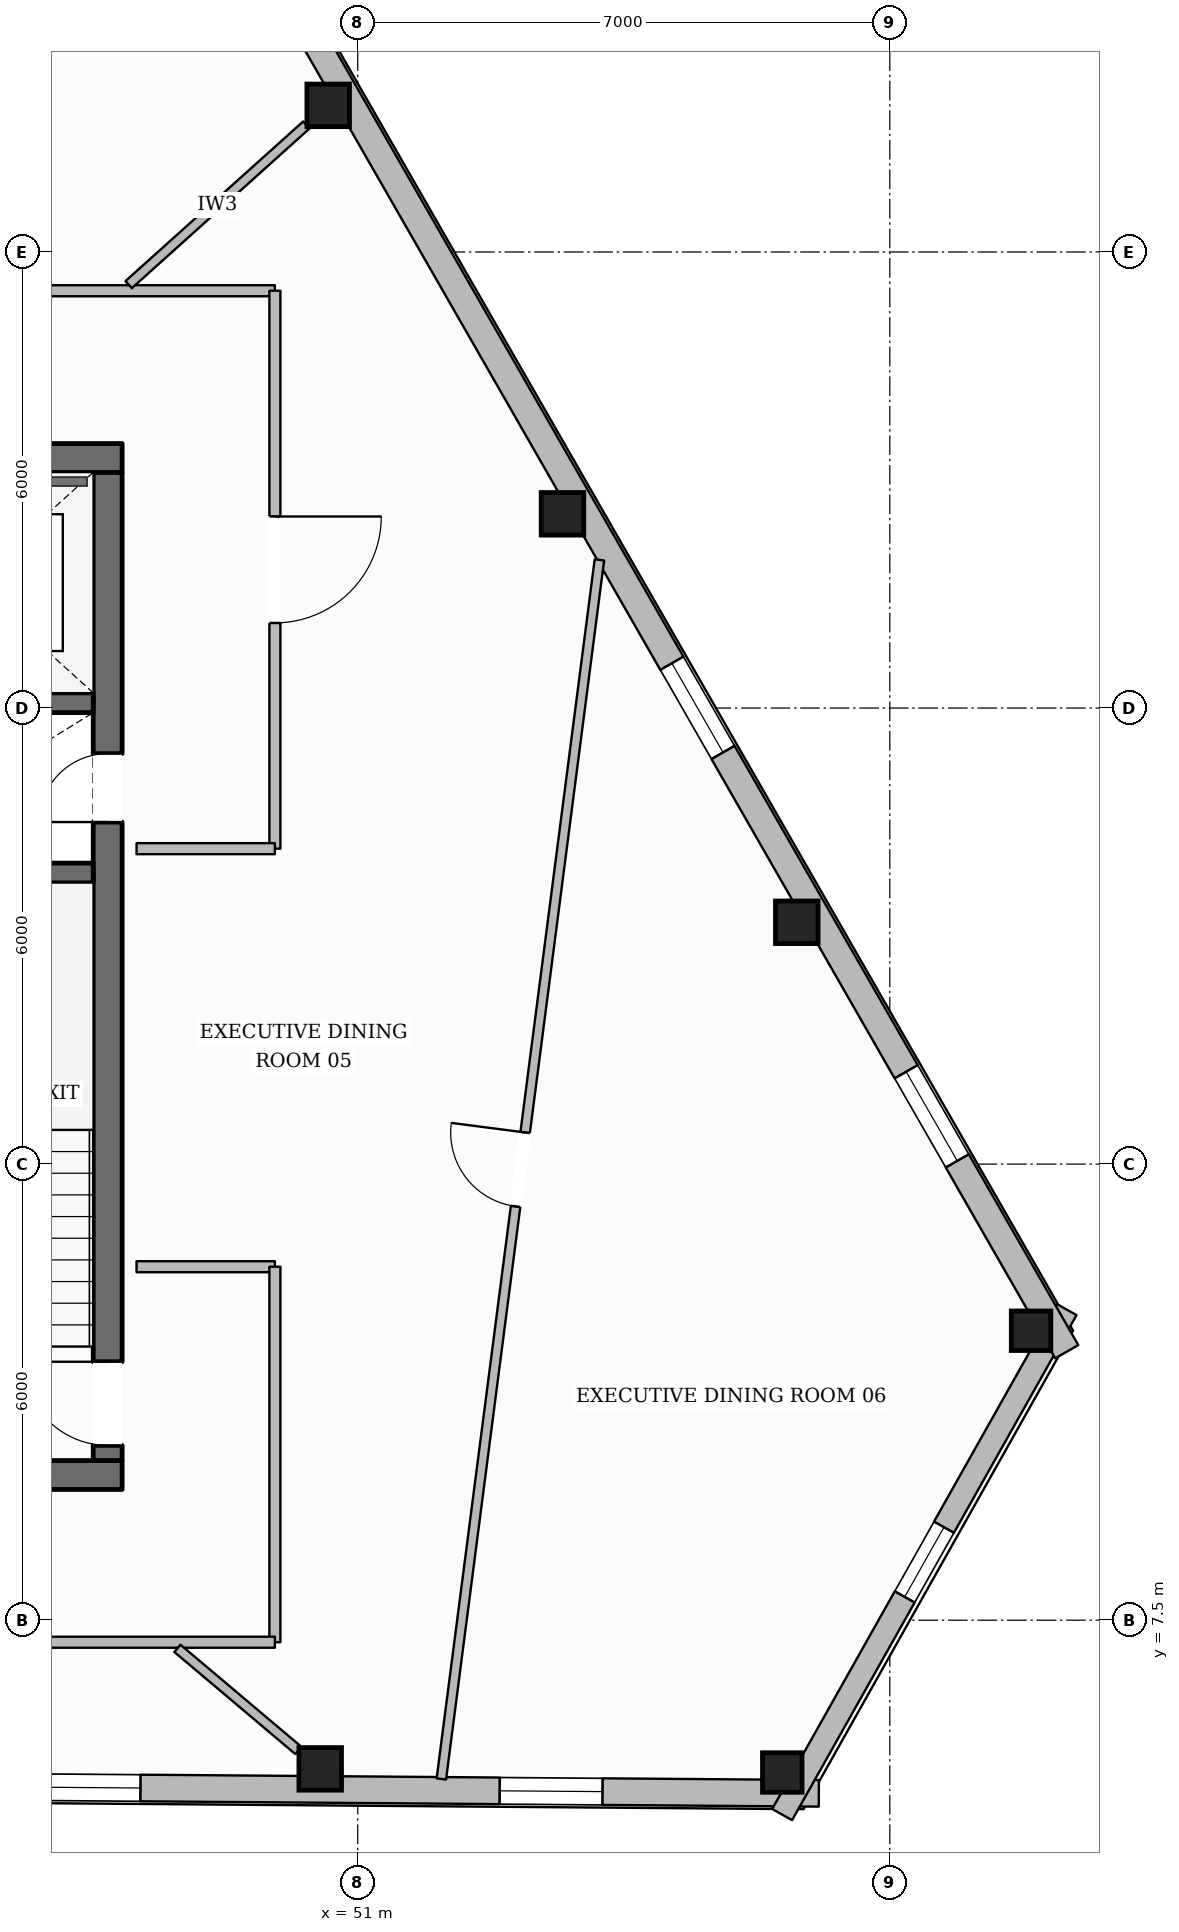
"""IFC4 building model, lengths in metres.
Left out: names, types, materials, properties, quantities, classifications, styles, units other than length and angle.
Written with IfcOpenShell. Run it as: python <this file> out.ifc"""

import sys

from ifc_helpers import new_model, si_unit, direction, frame, frame_2d, origin, origin_2d, place, context, subcontext, project, spatial, rectangle, hollow_rectangle, extrude, element, fill, save


model = new_model("IFC4")
c1 = context("Model", 3, precision=1e-05, world=origin(), true_north=direction((0.0, 1.0)))
c2 = subcontext(c1, "Body", "Model", "MODEL_VIEW")
j1 = project(units=[si_unit("LENGTHUNIT", "METRE"), si_unit("PLANEANGLEUNIT", "RADIAN")], contexts=[c1])
p1 = place(None, origin())
s1 = spatial("IfcSite", under=j1, at=p1, CompositionType="ELEMENT")
p2 = place(p1, origin())
s2 = spatial("IfcBuilding", under=s1, at=p2, CompositionType="ELEMENT")
p3 = place(p2, frame((0.0, 0.0, 243.35)))
s3 = spatial("IfcBuildingStorey", under=s2, at=p3, CompositionType="ELEMENT", Elevation=243.35)
p4 = place(p3, frame((28.1, 9.41, 0.0), z_axis=(0.0, 0.0, 1.0), x_axis=(1.0, 0.0, 0.0)))
e1 = element("IfcWall", 1, at=p4, inside=s3, PredefinedType="SOLIDWALL", context=c2, shape_type="SweptSolid", body=[
    extrude(rectangle(XDim=19.8, YDim=0.38, at=frame_2d((9.9, 0.0))), origin(), (0.0, 0.0, 1.0), 3.61),
])
p5 = place(p4, frame((10.4, 0.0, 0.0)))
e2 = element("IfcOpeningElement", 2, at=p5, cuts=e1, PredefinedType="OPENING", context=c2, shape_type="SweptSolid", body=[
    extrude(rectangle(XDim=1.4, YDim=2.2, at=frame_2d((0.7, 1.1))), frame((0.0, 0.2, 0.0), z_axis=(0.0, -1.0, 0.0), x_axis=(1.0, 0.0, 0.0)), (0.0, 0.0, 1.0), 0.4),
])
p6 = place(p3, frame((28.1, 22.79, 0.0), z_axis=(0.0, 0.0, 1.0), x_axis=(1.0, 0.0, 0.0)))
e3 = element("IfcWall", 3, at=p6, inside=s3, PredefinedType="SOLIDWALL", context=c2, shape_type="SweptSolid", body=[
    extrude(rectangle(XDim=19.8, YDim=0.38, at=frame_2d((9.9, 0.0))), origin(), (0.0, 0.0, 1.0), 3.61),
])
p7 = place(p6, frame((6.175, 0.0, 0.0)))
e4 = element("IfcOpeningElement", 4, at=p7, cuts=e3, PredefinedType="OPENING", context=c2, shape_type="SweptSolid", body=[
    extrude(rectangle(XDim=1.05, YDim=2.15, at=frame_2d((0.525, 1.075))), frame((0.0, 0.2, 0.0), z_axis=(0.0, -1.0, 0.0), x_axis=(1.0, 0.0, 0.0)), (0.0, 0.0, 1.0), 0.4),
])
p8 = place(p6, frame((12.575, 0.0, 0.0)))
e5 = element("IfcOpeningElement", 5, at=p8, cuts=e3, PredefinedType="OPENING", context=c2, shape_type="SweptSolid", body=[
    extrude(rectangle(XDim=1.05, YDim=2.15, at=frame_2d((0.525, 1.075))), frame((0.0, 0.2, 0.0), z_axis=(0.0, -1.0, 0.0), x_axis=(1.0, 0.0, 0.0)), (0.0, 0.0, 1.0), 0.4),
])
p9 = place(p3, frame((47.71, 9.6, 0.0), z_axis=(0.0, 0.0, 1.0), x_axis=(0.0, 1.0, 0.0)))
e6 = element("IfcWall", 6, at=p9, inside=s3, PredefinedType="SOLIDWALL", context=c2, shape_type="SweptSolid", body=[
    extrude(rectangle(XDim=13.0, YDim=0.38, at=frame_2d((6.5, 0.0))), origin(), (0.0, 0.0, 1.0), 3.61),
])
p10 = place(p9, frame((0.2, 0.0, 0.0)))
e7 = element("IfcOpeningElement", 7, at=p10, cuts=e6, PredefinedType="OPENING", context=c2, shape_type="SweptSolid", body=[
    extrude(rectangle(XDim=1.1, YDim=2.15, at=frame_2d((0.55, 1.075))), frame((0.0, 0.2, 0.0), z_axis=(0.0, -1.0, 0.0), x_axis=(1.0, 0.0, 0.0)), (0.0, 0.0, 1.0), 0.4),
])
p11 = place(p9, frame((8.4, 0.0, 0.0)))
e8 = element("IfcOpeningElement", 8, at=p11, cuts=e6, PredefinedType="OPENING", context=c2, shape_type="SweptSolid", body=[
    extrude(rectangle(XDim=0.9, YDim=2.1, at=frame_2d((0.45, 1.05))), frame((0.0, 0.2, 0.0), z_axis=(0.0, -1.0, 0.0), x_axis=(1.0, 0.0, 0.0)), (0.0, 0.0, 1.0), 0.4),
])
for number, where, z_axis, x_axis in (
    (9, (44.32, 17.33, 0.0), (0.0, 0.0, 1.0), (1.0, 0.0, 0.0)),
    (10, (44.32, 19.57, 0.0), (0.0, 0.0, 1.0), (1.0, 0.0, 0.0)),
):
    element("IfcWall", number, at=place(p3, frame(where, z_axis=z_axis, x_axis=x_axis)), inside=s3, PredefinedType="SHEAR", context=c2, shape_type="SweptSolid", body=[
        extrude(rectangle(XDim=3.2, YDim=0.26, at=frame_2d((1.6, 0.0))), origin(), (0.0, 0.0, 1.0), 3.61),
    ])
p12 = place(p3, frame((50.507, 5.544, 0.0), z_axis=(0.0, 0.0, 1.0), x_axis=(1.0, 0.0, 0.0)))
e11 = element("IfcColumn", 11, at=p12, inside=s3, PredefinedType="COLUMN", context=c2, shape_type="SweptSolid", body=[
    extrude(hollow_rectangle(XDim=0.56, YDim=0.56, WallThickness=0.025, at=origin_2d()), origin(), (0.0, 0.0, 1.0), 3.61),
])
for number, where, z_axis, x_axis in (
    (12, (56.585, 5.496, 0.0), (0.0, 0.0, 1.0), (1.0, 0.0, 0.0)),
    (13, (59.858, 11.308, 0.0), (0.0, 0.0, 1.0), (1.0, 0.0, 0.0)),
):
    element("IfcColumn", number, at=place(p3, frame(where, z_axis=z_axis, x_axis=x_axis)), inside=s3, PredefinedType="COLUMN", context=c2, shape_type="SweptSolid", body=[
        extrude(hollow_rectangle(XDim=0.52, YDim=0.52, WallThickness=0.024, at=origin_2d()), origin(), (0.0, 0.0, 1.0), 3.61),
    ])
for number, where, z_axis, x_axis in (
    (14, (56.776, 16.681, 0.0), (0.0, 0.0, 1.0), (1.0, 0.0, 0.0)),
    (15, (53.694, 22.055, 0.0), (0.0, 0.0, 1.0), (1.0, 0.0, 0.0)),
    (16, (50.612, 27.429, 0.0), (0.0, 0.0, 1.0), (1.0, 0.0, 0.0)),
):
    element("IfcColumn", number, at=place(p3, frame(where, z_axis=z_axis, x_axis=x_axis)), inside=s3, PredefinedType="COLUMN", context=c2, shape_type="SweptSolid", body=[
        extrude(hollow_rectangle(XDim=0.56, YDim=0.56, WallThickness=0.025, at=origin_2d()), origin(), (0.0, 0.0, 1.0), 3.61),
    ])
p13 = place(p3, frame((57.066, 5.222, 0.0), z_axis=(0.0, 0.0, 1.0), x_axis=(-0.999969217333, 0.007846297637, 0.0)))
e17 = element("IfcWall", 17, at=p13, inside=s3, PredefinedType="STANDARD", context=c2, shape_type="SweptSolid", body=[
    extrude(rectangle(XDim=37.432, YDim=0.35, at=frame_2d((18.716, 0.0))), origin(), (0.0, 0.0, 1.0), 3.196),
])
p14 = place(p13, frame((33.242, 0.0, 0.65)))
e18 = element("IfcOpeningElement", 18, at=p14, cuts=e17, PredefinedType="OPENING", context=c2, shape_type="SweptSolid", body=[
    extrude(rectangle(XDim=1.35, YDim=1.75, at=frame_2d((0.675, 0.875))), frame((0.0, 0.185, 0.0), z_axis=(0.0, -1.0, 0.0), x_axis=(1.0, 0.0, 0.0)), (0.0, 0.0, 1.0), 0.37),
])
p15 = place(p13, frame((27.163, 0.0, 0.65)))
e19 = element("IfcOpeningElement", 19, at=p15, cuts=e17, PredefinedType="OPENING", context=c2, shape_type="SweptSolid", body=[
    extrude(rectangle(XDim=1.35, YDim=1.75, at=frame_2d((0.675, 0.875))), frame((0.0, 0.185, 0.0), z_axis=(0.0, -1.0, 0.0), x_axis=(1.0, 0.0, 0.0)), (0.0, 0.0, 1.0), 0.37),
])
p16 = place(p13, frame((15.005, 0.0, 0.65)))
e20 = element("IfcOpeningElement", 20, at=p16, cuts=e17, PredefinedType="OPENING", context=c2, shape_type="SweptSolid", body=[
    extrude(rectangle(XDim=1.35, YDim=1.75, at=frame_2d((0.675, 0.875))), frame((0.0, 0.185, 0.0), z_axis=(0.0, -1.0, 0.0), x_axis=(1.0, 0.0, 0.0)), (0.0, 0.0, 1.0), 0.37),
])
p17 = place(p13, frame((8.927, 0.0, 0.65)))
e21 = element("IfcOpeningElement", 21, at=p17, cuts=e17, PredefinedType="OPENING", context=c2, shape_type="SweptSolid", body=[
    extrude(rectangle(XDim=1.35, YDim=1.75, at=frame_2d((0.675, 0.875))), frame((0.0, 0.185, 0.0), z_axis=(0.0, -1.0, 0.0), x_axis=(1.0, 0.0, 0.0)), (0.0, 0.0, 1.0), 0.37),
])
p18 = place(p13, frame((2.847, 0.0, 0.65)))
e22 = element("IfcOpeningElement", 22, at=p18, cuts=e17, PredefinedType="OPENING", context=c2, shape_type="SweptSolid", body=[
    extrude(rectangle(XDim=1.35, YDim=1.75, at=frame_2d((0.675, 0.875))), frame((0.0, 0.185, 0.0), z_axis=(0.0, -1.0, 0.0), x_axis=(1.0, 0.0, 0.0)), (0.0, 0.0, 1.0), 0.37),
])
p19 = place(p3, frame((60.326, 11.587, 0.0), z_axis=(0.0, 0.0, 1.0), x_axis=(-0.490709559807, -0.871323205197, 0.0)))
e23 = element("IfcWall", 23, at=p19, inside=s3, PredefinedType="STANDARD", context=c2, shape_type="SweptSolid", body=[
    extrude(rectangle(XDim=7.626, YDim=0.3, at=frame_2d((3.813, 0.0))), origin(), (0.0, 0.0, 1.0), 3.196),
])
p20 = place(p19, frame((3.288, 0.0, 0.65)))
e24 = element("IfcOpeningElement", 24, at=p20, cuts=e23, PredefinedType="OPENING", context=c2, shape_type="SweptSolid", body=[
    extrude(rectangle(XDim=1.05, YDim=1.7, at=frame_2d((0.525, 0.85))), frame((0.0, 0.16, 0.0), z_axis=(0.0, -1.0, 0.0), x_axis=(1.0, 0.0, 0.0)), (0.0, 0.0, 1.0), 0.32),
])
p21 = place(p3, frame((41.362, 44.097, 0.0), z_axis=(0.0, 0.0, 1.0), x_axis=(0.497556414716, -0.867431619308, 0.0)))
e25 = element("IfcWall", 25, at=p21, inside=s3, PredefinedType="STANDARD", context=c2, shape_type="SweptSolid", body=[
    extrude(rectangle(XDim=38.118, YDim=0.35, at=frame_2d((19.059, 0.0))), origin(), (0.0, 0.0, 1.0), 3.196),
])
p22 = place(p21, frame((33.873, 0.0, 0.65)))
e26 = element("IfcOpeningElement", 26, at=p22, cuts=e25, PredefinedType="OPENING", context=c2, shape_type="SweptSolid", body=[
    extrude(rectangle(XDim=1.35, YDim=1.75, at=frame_2d((0.675, 0.875))), frame((0.0, 0.185, 0.0), z_axis=(0.0, -1.0, 0.0), x_axis=(1.0, 0.0, 0.0)), (0.0, 0.0, 1.0), 0.37),
])
p23 = place(p21, frame((27.678, 0.0, 0.65)))
e27 = element("IfcOpeningElement", 27, at=p23, cuts=e25, PredefinedType="OPENING", context=c2, shape_type="SweptSolid", body=[
    extrude(rectangle(XDim=1.35, YDim=1.75, at=frame_2d((0.675, 0.875))), frame((0.0, 0.185, 0.0), z_axis=(0.0, -1.0, 0.0), x_axis=(1.0, 0.0, 0.0)), (0.0, 0.0, 1.0), 0.37),
])
p24 = place(p21, frame((15.288, 0.0, 0.65)))
e28 = element("IfcOpeningElement", 28, at=p24, cuts=e25, PredefinedType="OPENING", context=c2, shape_type="SweptSolid", body=[
    extrude(rectangle(XDim=1.35, YDim=1.75, at=frame_2d((0.675, 0.875))), frame((0.0, 0.185, 0.0), z_axis=(0.0, -1.0, 0.0), x_axis=(1.0, 0.0, 0.0)), (0.0, 0.0, 1.0), 0.37),
])
p25 = place(p21, frame((9.093, 0.0, 0.65)))
e29 = element("IfcOpeningElement", 29, at=p25, cuts=e25, PredefinedType="OPENING", context=c2, shape_type="SweptSolid", body=[
    extrude(rectangle(XDim=1.35, YDim=1.75, at=frame_2d((0.675, 0.875))), frame((0.0, 0.185, 0.0), z_axis=(0.0, -1.0, 0.0), x_axis=(1.0, 0.0, 0.0)), (0.0, 0.0, 1.0), 0.37),
])
p26 = place(p21, frame((2.898, 0.0, 0.65)))
e30 = element("IfcOpeningElement", 30, at=p26, cuts=e25, PredefinedType="OPENING", context=c2, shape_type="SweptSolid", body=[
    extrude(rectangle(XDim=1.35, YDim=1.75, at=frame_2d((0.675, 0.875))), frame((0.0, 0.185, 0.0), z_axis=(0.0, -1.0, 0.0), x_axis=(1.0, 0.0, 0.0)), (0.0, 0.0, 1.0), 0.37),
])
p27 = place(p3, frame((45.2, 24.99, 0.0), z_axis=(0.0, 0.0, 1.0), x_axis=(1.0, 0.0, 0.0)))
e31 = element("IfcWall", 31, at=p27, inside=s3, PredefinedType="PARTITIONING", context=c2, shape_type="SweptSolid", body=[
    extrude(rectangle(XDim=4.71, YDim=0.145, at=frame_2d((2.355, 0.0))), origin(), (0.0, 0.0, 1.0), 3.61),
])
p28 = place(p3, frame((49.91, 24.99, 0.0), z_axis=(0.0, 0.0, 1.0), x_axis=(0.0, -1.0, 0.0)))
e32 = element("IfcWall", 32, at=p28, inside=s3, PredefinedType="PARTITIONING", context=c2, shape_type="SweptSolid", body=[
    extrude(rectangle(XDim=7.34, YDim=0.145, at=frame_2d((3.67, 0.0))), origin(), (0.0, 0.0, 1.0), 3.349),
])
p29 = place(p28, frame((2.97, 0.0, 0.0)))
e33 = element("IfcOpeningElement", 33, at=p29, cuts=e32, PredefinedType="OPENING", context=c2, shape_type="SweptSolid", body=[
    extrude(rectangle(XDim=1.4, YDim=2.2, at=frame_2d((0.7, 1.1))), frame((0.0, 0.083, 0.0), z_axis=(0.0, -1.0, 0.0), x_axis=(1.0, 0.0, 0.0)), (0.0, 0.0, 1.0), 0.165),
])
for number, where, z_axis, x_axis in (
    (34, (49.91, 17.65, 0.0), (0.0, 0.0, 1.0), (-1.0, 0.0, 0.0)),
    (35, (48.09, 12.15, 0.0), (0.0, 0.0, 1.0), (1.0, 0.0, 0.0)),
):
    element("IfcWall", number, at=place(p3, frame(where, z_axis=z_axis, x_axis=x_axis)), inside=s3, PredefinedType="PARTITIONING", context=c2, shape_type="SweptSolid", body=[
        extrude(rectangle(XDim=1.82, YDim=0.145, at=frame_2d((0.91, 0.0))), origin(), (0.0, 0.0, 1.0), 3.61),
    ])
p30 = place(p3, frame((49.91, 12.15, 0.0), z_axis=(0.0, 0.0, 1.0), x_axis=(0.0, -1.0, 0.0)))
e36 = element("IfcWall", 36, at=p30, inside=s3, PredefinedType="PARTITIONING", context=c2, shape_type="SweptSolid", body=[
    extrude(rectangle(XDim=4.94, YDim=0.145, at=frame_2d((2.47, 0.0))), origin(), (0.0, 0.0, 1.0), 3.61),
])
p31 = place(p3, frame((49.91, 7.21, 0.0), z_axis=(0.0, 0.0, 1.0), x_axis=(-1.0, 0.0, 0.0)))
e37 = element("IfcWall", 37, at=p31, inside=s3, PredefinedType="PARTITIONING", context=c2, shape_type="SweptSolid", body=[
    extrude(rectangle(XDim=23.82, YDim=0.145, at=frame_2d((11.91, 0.0))), origin(), (0.0, 0.0, 1.0), 3.61),
])
p32 = place(p31, frame((11.817, 0.0, 0.0)))
e38 = element("IfcOpeningElement", 38, at=p32, cuts=e37, PredefinedType="OPENING", context=c2, shape_type="SweptSolid", body=[
    extrude(rectangle(XDim=1.4, YDim=2.2, at=frame_2d((0.7, 1.1))), frame((0.0, 0.083, 0.0), z_axis=(0.0, -1.0, 0.0), x_axis=(1.0, 0.0, 0.0)), (0.0, 0.0, 1.0), 0.165),
])
p33 = place(p3, frame((47.986, 25.071, 0.0), z_axis=(0.0, 0.0, 1.0), x_axis=(0.743935182086, 0.66825178253, 0.0)))
e39 = element("IfcWall", 39, at=p33, inside=s3, PredefinedType="PARTITIONING", context=c2, shape_type="SweptSolid", body=[
    extrude(rectangle(XDim=3.142, YDim=0.125, at=frame_2d((1.571, 0.0))), origin(), (0.0, 0.0, 1.0), 3.61),
])
p34 = place(p3, frame((48.628, 7.129, 0.0), z_axis=(0.0, 0.0, 1.0), x_axis=(0.764226447887, -0.644948010579, 0.0)))
e40 = element("IfcWall", 40, at=p34, inside=s3, PredefinedType="PARTITIONING", context=c2, shape_type="SweptSolid", body=[
    extrude(rectangle(XDim=2.082, YDim=0.125, at=frame_2d((1.041, 0.0))), origin(), (0.0, 0.0, 1.0), 3.61),
])
p35 = place(p3, frame((52.1, 5.411, 0.0), z_axis=(0.0, 0.0, 1.0), x_axis=(0.128602141962, 0.991696268564, 0.0)))
e41 = element("IfcWall", 41, at=p35, inside=s3, PredefinedType="PARTITIONING", context=c2, shape_type="SweptSolid", body=[
    extrude(rectangle(XDim=16.173, YDim=0.125, at=frame_2d((8.086, 0.0))), origin(), (0.0, 0.0, 1.0), 3.349),
])
p36 = place(p35, frame((7.596, 0.0, 0.0)))
e42 = element("IfcOpeningElement", 42, at=p36, cuts=e41, PredefinedType="OPENING", context=c2, shape_type="SweptSolid", body=[
    extrude(rectangle(XDim=0.98, YDim=2.15, at=frame_2d((0.49, 1.075))), frame((0.0, 0.073, 0.0), z_axis=(0.0, -1.0, 0.0), x_axis=(1.0, 0.0, 0.0)), (0.0, 0.0, 1.0), 0.145),
])
p37 = place(p17, origin())
e43 = element("IfcWindow", 43, at=p37, inside=s3, PartitioningType="SINGLE_PANEL", PredefinedType="WINDOW", context=c2, shape_type="SweptSolid", body=[
    extrude(rectangle(XDim=1.35, YDim=1.75, at=frame_2d((0.675, 0.875))), frame((0.0, 0.03, 0.0), z_axis=(0.0, -1.0, 0.0), x_axis=(1.0, 0.0, 0.0)), (0.0, 0.0, 1.0), 0.06),
])
fill(e21, e43)
p38 = place(p18, origin())
e44 = element("IfcWindow", 44, at=p38, inside=s3, PartitioningType="SINGLE_PANEL", PredefinedType="WINDOW", context=c2, shape_type="SweptSolid", body=[
    extrude(rectangle(XDim=1.35, YDim=1.75, at=frame_2d((0.675, 0.875))), frame((0.0, 0.03, 0.0), z_axis=(0.0, -1.0, 0.0), x_axis=(1.0, 0.0, 0.0)), (0.0, 0.0, 1.0), 0.06),
])
fill(e22, e44)
p39 = place(p22, origin())
e45 = element("IfcWindow", 45, at=p39, inside=s3, PartitioningType="SINGLE_PANEL", PredefinedType="WINDOW", context=c2, shape_type="SweptSolid", body=[
    extrude(rectangle(XDim=1.35, YDim=1.75, at=frame_2d((0.675, 0.875))), frame((0.0, 0.03, 0.0), z_axis=(0.0, -1.0, 0.0), x_axis=(1.0, 0.0, 0.0)), (0.0, 0.0, 1.0), 0.06),
])
fill(e26, e45)
p40 = place(p23, origin())
e46 = element("IfcWindow", 46, at=p40, inside=s3, PartitioningType="SINGLE_PANEL", PredefinedType="WINDOW", context=c2, shape_type="SweptSolid", body=[
    extrude(rectangle(XDim=1.35, YDim=1.75, at=frame_2d((0.675, 0.875))), frame((0.0, 0.03, 0.0), z_axis=(0.0, -1.0, 0.0), x_axis=(1.0, 0.0, 0.0)), (0.0, 0.0, 1.0), 0.06),
])
fill(e27, e46)
p41 = place(p20, origin())
e47 = element("IfcWindow", 47, at=p41, inside=s3, PartitioningType="SINGLE_PANEL", PredefinedType="WINDOW", context=c2, shape_type="SweptSolid", body=[
    extrude(rectangle(XDim=1.05, YDim=1.7, at=frame_2d((0.525, 0.85))), frame((0.0, 0.03, 0.0), z_axis=(0.0, -1.0, 0.0), x_axis=(1.0, 0.0, 0.0)), (0.0, 0.0, 1.0), 0.06),
])
fill(e24, e47)
p42 = place(p10, origin())
e48 = element("IfcDoor", 48, at=p42, inside=s3, OperationType="SINGLE_SWING_RIGHT", PredefinedType="DOOR", context=c2, shape_type="SweptSolid", body=[
    extrude(rectangle(XDim=1.1, YDim=2.15, at=frame_2d((0.55, 1.075))), frame((0.0, 0.025, 0.0), z_axis=(0.0, -1.0, 0.0), x_axis=(1.0, 0.0, 0.0)), (0.0, 0.0, 1.0), 0.05),
])
fill(e7, e48)
p43 = place(p11, origin())
e49 = element("IfcDoor", 49, at=p43, inside=s3, OperationType="SINGLE_SWING_LEFT", PredefinedType="DOOR", context=c2, shape_type="SweptSolid", body=[
    extrude(rectangle(XDim=0.9, YDim=2.1, at=frame_2d((0.45, 1.05))), frame((0.0, 0.025, 0.0), z_axis=(0.0, -1.0, 0.0), x_axis=(1.0, 0.0, 0.0)), (0.0, 0.0, 1.0), 0.05),
])
fill(e8, e49)
p44 = place(p29, origin())
e50 = element("IfcDoor", 50, at=p44, inside=s3, OperationType="SINGLE_SWING_LEFT", PredefinedType="DOOR", context=c2, shape_type="SweptSolid", body=[
    extrude(rectangle(XDim=1.4, YDim=2.2, at=frame_2d((0.7, 1.1))), frame((0.0, 0.025, 0.0), z_axis=(0.0, -1.0, 0.0), x_axis=(1.0, 0.0, 0.0)), (0.0, 0.0, 1.0), 0.05),
])
fill(e33, e50)
p45 = place(p36, origin())
e51 = element("IfcDoor", 51, at=p45, inside=s3, OperationType="SINGLE_SWING_RIGHT", PredefinedType="DOOR", context=c2, shape_type="SweptSolid", body=[
    extrude(rectangle(XDim=0.98, YDim=2.15, at=frame_2d((0.49, 1.075))), frame((0.0, 0.025, 0.0), z_axis=(0.0, -1.0, 0.0), x_axis=(1.0, 0.0, 0.0)), (0.0, 0.0, 1.0), 0.05),
])
fill(e42, e51)
save(model, sys.argv[1])
